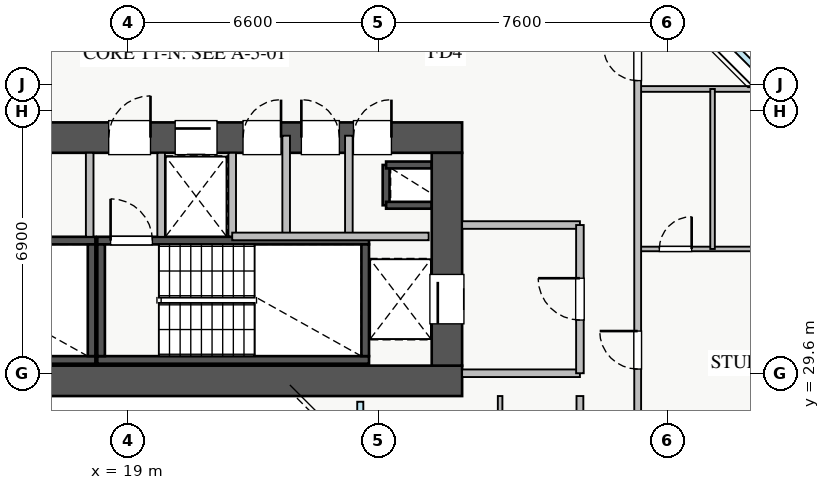
"""IFC4 building model, lengths in metres.
Left out: names, types, materials, properties, quantities, classifications, styles, units other than length and angle.
Written with IfcOpenShell. Run it as: python <this file> out.ifc"""

import sys

from ifc_helpers import new_model, si_unit, direction, frame, frame_2d, origin, place, context, subcontext, project, spatial, rectangle, extrude, source, transform, mapped, element, fill, save


model = new_model("IFC4")
c1 = context("Model", 3, precision=1e-05, world=origin(), true_north=direction((0.0, 1.0)))
c2 = subcontext(c1, "Body", "Model", "MODEL_VIEW")
j1 = project(units=[si_unit("LENGTHUNIT", "METRE"), si_unit("PLANEANGLEUNIT", "RADIAN")], contexts=[c1])
p1 = place(None, origin())
s1 = spatial("IfcSite", under=j1, at=p1, CompositionType="ELEMENT")
p2 = place(p1, origin())
s2 = spatial("IfcBuilding", under=s1, at=p2, CompositionType="ELEMENT")
p3 = place(p2, frame((0.0, 0.0, 79.5)))
s3 = spatial("IfcBuildingStorey", under=s2, at=p3, CompositionType="ELEMENT", Elevation=79.5)
p4 = place(p3, frame((25.8, 34.02, 0.0), z_axis=(0.0, 0.0, 1.0), x_axis=(0.0, 1.0, 0.0)))
e1 = element("IfcWall", 1, at=p4, inside=s3, PredefinedType="SHEAR", context=c2, shape_type="SweptSolid", body=[
    extrude(rectangle(XDim=1.06, YDim=0.18, at=frame_2d((0.53, 0.0))), origin(), (0.0, 0.0, 1.0), 3.07),
])
for number, where, z_axis, x_axis in (
    (2, (25.8, 35.08, 0.0), (0.0, 0.0, 1.0), (1.0, 0.0, 0.0)),
    (3, (25.8, 34.02, 0.0), (0.0, 0.0, 1.0), (1.0, 0.0, 0.0)),
):
    element("IfcWall", number, at=place(p3, frame(where, z_axis=z_axis, x_axis=x_axis)), inside=s3, PredefinedType="SHEAR", context=c2, shape_type="SweptSolid", body=[
        extrude(rectangle(XDim=1.2, YDim=0.18, at=frame_2d((0.6, 0.0))), origin(), (0.0, 0.0, 1.0), 3.07),
    ])
p5 = place(p3, frame((19.88, 33.2, 0.0), z_axis=(0.0, 0.0, 1.0), x_axis=(1.0, 0.0, 0.0)))
e4 = element("IfcWall", 4, at=p5, inside=s3, PredefinedType="SHEAR", context=c2, shape_type="SweptSolid", body=[
    extrude(rectangle(XDim=1.87, YDim=0.18, at=frame_2d((0.935, 0.0))), origin(), (0.0, 0.0, 1.0), 3.07),
])
p6 = place(p3, frame((11.0, 29.95, 0.0), z_axis=(0.0, 0.0, 1.0), x_axis=(1.0, 0.0, 0.0)))
e5 = element("IfcWall", 5, at=p6, inside=s3, PredefinedType="SHEAR", context=c2, shape_type="SweptSolid", body=[
    extrude(rectangle(XDim=7.15, YDim=0.2, at=frame_2d((3.575, 0.0))), origin(), (0.0, 0.0, 1.0), 3.25),
])
p7 = place(p3, frame((11.0, 33.09, 0.0), z_axis=(0.0, 0.0, 1.0), x_axis=(1.0, 0.0, 0.0)))
e6 = element("IfcWall", 6, at=p7, inside=s3, PredefinedType="SHEAR", context=c2, shape_type="SweptSolid", body=[
    extrude(rectangle(XDim=7.15, YDim=0.2, at=frame_2d((3.575, 0.0))), origin(), (0.0, 0.0, 1.0), 3.25),
])
p8 = place(p7, frame((0.35, 0.0, 0.0)))
e7 = element("IfcOpeningElement", 7, at=p8, cuts=e6, PredefinedType="OPENING", context=c2, shape_type="SweptSolid", body=[
    extrude(rectangle(XDim=1.1, YDim=2.05, at=frame_2d((0.55, 1.025))), frame((0.0, 0.11, 0.0), z_axis=(0.0, -1.0, 0.0), x_axis=(1.0, 0.0, 0.0)), (0.0, 0.0, 1.0), 0.22),
])
p9 = place(p3, frame((18.05, 30.05, 0.0), z_axis=(0.0, 0.0, 1.0), x_axis=(0.0, 1.0, 0.0)))
e8 = element("IfcWall", 8, at=p9, inside=s3, PredefinedType="SHEAR", context=c2, shape_type="SweptSolid", body=[
    extrude(rectangle(XDim=2.94, YDim=0.2, at=frame_2d((1.47, 0.0))), origin(), (0.0, 0.0, 1.0), 3.25),
])
p10 = place(p3, frame((18.2, 29.95, 0.0), z_axis=(0.0, 0.0, 1.0), x_axis=(1.0, 0.0, 0.0)))
e9 = element("IfcWall", 9, at=p10, inside=s3, PredefinedType="SHEAR", context=c2, shape_type="SweptSolid", body=[
    extrude(rectangle(XDim=7.15, YDim=0.2, at=frame_2d((3.575, 0.0))), origin(), (0.0, 0.0, 1.0), 3.25),
])
p11 = place(p3, frame((18.2, 33.09, 0.0), z_axis=(0.0, 0.0, 1.0), x_axis=(1.0, 0.0, 0.0)))
e10 = element("IfcWall", 10, at=p11, inside=s3, PredefinedType="SHEAR", context=c2, shape_type="SweptSolid", body=[
    extrude(rectangle(XDim=7.15, YDim=0.2, at=frame_2d((3.575, 0.0))), origin(), (0.0, 0.0, 1.0), 3.25),
])
p12 = place(p11, frame((0.35, 0.0, 0.0)))
e11 = element("IfcOpeningElement", 11, at=p12, cuts=e10, PredefinedType="OPENING", context=c2, shape_type="SweptSolid", body=[
    extrude(rectangle(XDim=1.1, YDim=2.05, at=frame_2d((0.55, 1.025))), frame((0.0, 0.11, 0.0), z_axis=(0.0, -1.0, 0.0), x_axis=(1.0, 0.0, 0.0)), (0.0, 0.0, 1.0), 0.22),
])
for number, where, z_axis, x_axis in (
    (12, (18.3, 30.05, 0.0), (0.0, 0.0, 1.0), (0.0, 1.0, 0.0)),
    (13, (25.25, 30.05, 0.0), (0.0, 0.0, 1.0), (0.0, 1.0, 0.0)),
):
    element("IfcWall", number, at=place(p3, frame(where, z_axis=z_axis, x_axis=x_axis)), inside=s3, PredefinedType="SHEAR", context=c2, shape_type="SweptSolid", body=[
        extrude(rectangle(XDim=2.94, YDim=0.2, at=frame_2d((1.47, 0.0))), origin(), (0.0, 0.0, 1.0), 3.25),
    ])
p13 = place(p3, frame((10.2, 29.4, 0.0), z_axis=(0.0, 0.0, 1.0), x_axis=(1.0, 0.0, 0.0)))
e14 = element("IfcWall", 14, at=p13, inside=s3, PredefinedType="SHEAR", context=c2, shape_type="SweptSolid", body=[
    extrude(rectangle(XDim=17.6, YDim=0.8, at=frame_2d((8.8, 0.0))), origin(), (0.0, 0.0, 1.0), 3.25),
])
p14 = place(p3, frame((10.2, 35.8, 0.0), z_axis=(0.0, 0.0, 1.0), x_axis=(1.0, 0.0, 0.0)))
e15 = element("IfcWall", 15, at=p14, inside=s3, PredefinedType="SHEAR", context=c2, shape_type="SweptSolid", body=[
    extrude(rectangle(XDim=17.6, YDim=0.8, at=frame_2d((8.8, 0.0))), origin(), (0.0, 0.0, 1.0), 3.25),
])
p15 = place(p14, frame((1.15, 0.0, 0.0)))
e16 = element("IfcOpeningElement", 16, at=p15, cuts=e15, PredefinedType="OPENING", context=c2, shape_type="SweptSolid", body=[
    extrude(rectangle(XDim=1.1, YDim=2.05, at=frame_2d((0.55, 1.025))), frame((0.0, 0.41, 0.0), z_axis=(0.0, -1.0, 0.0), x_axis=(1.0, 0.0, 0.0)), (0.0, 0.0, 1.0), 0.82),
])
p16 = place(p14, frame((8.3, 0.0, 0.0)))
e17 = element("IfcOpeningElement", 17, at=p16, cuts=e15, PredefinedType="OPENING", context=c2, shape_type="SweptSolid", body=[
    extrude(rectangle(XDim=1.1, YDim=2.05, at=frame_2d((0.55, 1.025))), frame((0.0, 0.41, 0.0), z_axis=(0.0, -1.0, 0.0), x_axis=(1.0, 0.0, 0.0)), (0.0, 0.0, 1.0), 0.82),
])
p17 = place(p14, frame((10.05, 0.0, 0.0)))
e18 = element("IfcOpeningElement", 18, at=p17, cuts=e15, PredefinedType="OPENING", context=c2, shape_type="SweptSolid", body=[
    extrude(rectangle(XDim=1.1, YDim=2.05, at=frame_2d((0.55, 1.025))), frame((0.0, 0.41, 0.0), z_axis=(0.0, -1.0, 0.0), x_axis=(1.0, 0.0, 0.0)), (0.0, 0.0, 1.0), 0.82),
])
p18 = place(p14, frame((14.74, 0.0, 0.0)))
e19 = element("IfcOpeningElement", 19, at=p18, cuts=e15, PredefinedType="OPENING", context=c2, shape_type="SweptSolid", body=[
    extrude(rectangle(XDim=1.0, YDim=2.05, at=frame_2d((0.5, 1.025))), frame((0.0, 0.41, 0.0), z_axis=(0.0, -1.0, 0.0), x_axis=(1.0, 0.0, 0.0)), (0.0, 0.0, 1.0), 0.82),
])
p19 = place(p14, frame((11.835, 0.0, 0.0)))
e20 = element("IfcOpeningElement", 20, at=p19, cuts=e15, PredefinedType="OPENING", context=c2, shape_type="SweptSolid", body=[
    extrude(rectangle(XDim=1.0, YDim=2.05, at=frame_2d((0.5, 1.025))), frame((0.0, 0.41, 0.0), z_axis=(0.0, -1.0, 0.0), x_axis=(1.0, 0.0, 0.0)), (0.0, 0.0, 1.0), 0.82),
])
p20 = place(p14, frame((13.37, 0.0, 0.0)))
e21 = element("IfcOpeningElement", 21, at=p20, cuts=e15, PredefinedType="OPENING", context=c2, shape_type="SweptSolid", body=[
    extrude(rectangle(XDim=1.0, YDim=2.05, at=frame_2d((0.5, 1.025))), frame((0.0, 0.41, 0.0), z_axis=(0.0, -1.0, 0.0), x_axis=(1.0, 0.0, 0.0)), (0.0, 0.0, 1.0), 0.82),
])
p21 = place(p3, frame((27.4, 29.8, 0.0), z_axis=(0.0, 0.0, 1.0), x_axis=(0.0, 1.0, 0.0)))
e22 = element("IfcWall", 22, at=p21, inside=s3, PredefinedType="SHEAR", context=c2, shape_type="SweptSolid", body=[
    extrude(rectangle(XDim=5.6, YDim=0.8, at=frame_2d((2.8, 0.0))), origin(), (0.0, 0.0, 1.0), 3.25),
])
p22 = place(p21, frame((1.1, 0.0, 0.0)))
e23 = element("IfcOpeningElement", 23, at=p22, cuts=e22, PredefinedType="OPENING", context=c2, shape_type="SweptSolid", body=[
    extrude(rectangle(XDim=1.3, YDim=2.05, at=frame_2d((0.65, 1.025))), frame((0.0, 0.41, 0.0), z_axis=(0.0, -1.0, 0.0), x_axis=(1.0, 0.0, 0.0)), (0.0, 0.0, 1.0), 0.82),
])
for number, where, z_axis, x_axis in (
    (24, (27.8, 29.6, 0.0), (0.0, 0.0, 1.0), (1.0, 0.0, 0.0)),
    (25, (27.8, 33.5, 0.0), (0.0, 0.0, 1.0), (1.0, 0.0, 0.0)),
):
    element("IfcWall", number, at=place(p3, frame(where, z_axis=z_axis, x_axis=x_axis)), inside=s3, PredefinedType="PARTITIONING", context=c2, shape_type="SweptSolid", body=[
        extrude(rectangle(XDim=3.1, YDim=0.2, at=frame_2d((1.55, 0.0))), origin(), (0.0, 0.0, 1.0), 3.07),
    ])
p23 = place(p3, frame((30.9, 29.6, 0.0), z_axis=(0.0, 0.0, 1.0), x_axis=(0.0, 1.0, 0.0)))
e26 = element("IfcWall", 26, at=p23, inside=s3, PredefinedType="PARTITIONING", context=c2, shape_type="SweptSolid", body=[
    extrude(rectangle(XDim=3.9, YDim=0.2, at=frame_2d((1.95, 0.0))), origin(), (0.0, 0.0, 1.0), 3.07),
])
p24 = place(p23, frame((1.4, 0.0, 0.0)))
e27 = element("IfcOpeningElement", 27, at=p24, cuts=e26, PredefinedType="OPENING", context=c2, shape_type="SweptSolid", body=[
    extrude(rectangle(XDim=1.1, YDim=2.05, at=frame_2d((0.55, 1.025))), frame((0.0, 0.11, 0.0), z_axis=(0.0, -1.0, 0.0), x_axis=(1.0, 0.0, 0.0)), (0.0, 0.0, 1.0), 0.22),
])
for number, where, z_axis, x_axis in (
    (28, (18.0, 33.19, 0.0), (0.0, 0.0, 1.0), (0.0, 1.0, 0.0)),
    (29, (19.88, 33.19, 0.0), (0.0, 0.0, 1.0), (0.0, 1.0, 0.0)),
):
    element("IfcWall", number, at=place(p3, frame(where, z_axis=z_axis, x_axis=x_axis)), inside=s3, PredefinedType="PARTITIONING", context=c2, shape_type="SweptSolid", body=[
        extrude(rectangle(XDim=2.21, YDim=0.2, at=frame_2d((1.105, 0.0))), origin(), (0.0, 0.0, 1.0), 3.07),
    ])
p25 = place(p3, frame((24.82, 33.2, 0.0), z_axis=(0.0, 0.0, 1.0), x_axis=(0.0, 1.0, 0.0)))
e30 = element("IfcWall", 30, at=p25, inside=s3, PredefinedType="PARTITIONING", context=c2, shape_type="SweptSolid", body=[
    extrude(rectangle(XDim=2.65, YDim=0.2, at=frame_2d((1.325, 0.0))), origin(), (0.0, 0.0, 1.0), 3.07),
])
p26 = place(p3, frame((21.75, 33.2, 0.0), z_axis=(0.0, 0.0, 1.0), x_axis=(0.0, 1.0, 0.0)))
e31 = element("IfcWall", 31, at=p26, inside=s3, PredefinedType="PARTITIONING", context=c2, shape_type="SweptSolid", body=[
    extrude(rectangle(XDim=2.2, YDim=0.2, at=frame_2d((1.1, 0.0))), origin(), (0.0, 0.0, 1.0), 3.07),
])
p27 = place(p3, frame((23.17, 33.2, 0.0), z_axis=(0.0, 0.0, 1.0), x_axis=(0.0, 1.0, 0.0)))
e32 = element("IfcWall", 32, at=p27, inside=s3, PredefinedType="PARTITIONING", context=c2, shape_type="SweptSolid", body=[
    extrude(rectangle(XDim=2.65, YDim=0.2, at=frame_2d((1.325, 0.0))), origin(), (0.0, 0.0, 1.0), 3.07),
])
p28 = place(p3, frame((21.75, 33.2, 0.0), z_axis=(0.0, 0.0, 1.0), x_axis=(1.0, 0.0, 0.0)))
e33 = element("IfcWall", 33, at=p28, inside=s3, PredefinedType="PARTITIONING", context=c2, shape_type="SweptSolid", body=[
    extrude(rectangle(XDim=5.17, YDim=0.2, at=frame_2d((2.585, 0.0))), origin(), (0.0, 0.0, 1.0), 3.07),
])
p29 = place(p3, frame((32.42, 37.08, 0.0), z_axis=(0.0, 0.0, 1.0), x_axis=(1.0, 0.0, 0.0)))
e34 = element("IfcWall", 34, at=p29, inside=s3, PredefinedType="PARTITIONING", context=c2, shape_type="SweptSolid", body=[
    extrude(rectangle(XDim=5.33, YDim=0.15, at=frame_2d((2.665, 0.0))), origin(), (0.0, 0.0, 1.0), 3.07),
])
p30 = place(p3, frame((32.42, 32.87, 0.0), z_axis=(0.0, 0.0, 1.0), x_axis=(1.0, 0.0, 0.0)))
e35 = element("IfcWall", 35, at=p30, inside=s3, PredefinedType="PLUMBINGWALL", context=c2, shape_type="SweptSolid", body=[
    extrude(rectangle(XDim=5.33, YDim=0.12, at=frame_2d((2.665, 0.0))), origin(), (0.0, 0.0, 1.0), 3.07),
])
p31 = place(p30, frame((0.57, 0.0, 0.0)))
e36 = element("IfcOpeningElement", 36, at=p31, cuts=e35, PredefinedType="OPENING", context=c2, shape_type="SweptSolid", body=[
    extrude(rectangle(XDim=0.85, YDim=2.05, at=frame_2d((0.425, 1.025))), frame((0.0, 0.07, 0.0), z_axis=(0.0, -1.0, 0.0), x_axis=(1.0, 0.0, 0.0)), (0.0, 0.0, 1.0), 0.14),
])
p32 = place(p30, frame((3.19, 0.0, 0.0)))
e37 = element("IfcOpeningElement", 37, at=p32, cuts=e35, PredefinedType="OPENING", context=c2, shape_type="SweptSolid", body=[
    extrude(rectangle(XDim=0.9, YDim=2.05, at=frame_2d((0.45, 1.025))), frame((0.0, 0.07, 0.0), z_axis=(0.0, -1.0, 0.0), x_axis=(1.0, 0.0, 0.0)), (0.0, 0.0, 1.0), 0.14),
])
p33 = place(p3, frame((34.39, 32.87, 0.0), z_axis=(0.0, 0.0, 1.0), x_axis=(0.0, 1.0, 0.0)))
e38 = element("IfcWall", 38, at=p33, inside=s3, PredefinedType="PLUMBINGWALL", context=c2, shape_type="SweptSolid", body=[
    extrude(rectangle(XDim=4.21, YDim=0.12, at=frame_2d((2.105, 0.0))), origin(), (0.0, 0.0, 1.0), 3.07),
])
p34 = place(p3, frame((32.42, 7.21, 0.0), z_axis=(0.0, 0.0, 1.0), x_axis=(0.0, 1.0, 0.0)))
e39 = element("IfcWall", 39, at=p34, inside=s3, PredefinedType="PARTITIONING", context=c2, shape_type="SweptSolid", body=[
    extrude(rectangle(XDim=31.23, YDim=0.18, at=frame_2d((15.615, 0.0))), origin(), (0.0, 0.0, 1.0), 2.821),
])
p35 = place(p34, frame((30.09, 0.0, 0.0)))
e40 = element("IfcOpeningElement", 40, at=p35, cuts=e39, PredefinedType="OPENING", context=c2, shape_type="SweptSolid", body=[
    extrude(rectangle(XDim=0.9, YDim=2.05, at=frame_2d((0.45, 1.025))), frame((0.0, 0.1, 0.0), z_axis=(0.0, -1.0, 0.0), x_axis=(1.0, 0.0, 0.0)), (0.0, 0.0, 1.0), 0.2),
])
p36 = place(p34, frame((0.415, 0.0, 0.0)))
e41 = element("IfcOpeningElement", 41, at=p36, cuts=e39, PredefinedType="OPENING", context=c2, shape_type="SweptSolid", body=[
    extrude(rectangle(XDim=0.9, YDim=2.05, at=frame_2d((0.45, 1.025))), frame((0.0, 0.1, 0.0), z_axis=(0.0, -1.0, 0.0), x_axis=(1.0, 0.0, 0.0)), (0.0, 0.0, 1.0), 0.2),
])
p37 = place(p34, frame((5.675, 0.0, 0.0)))
e42 = element("IfcOpeningElement", 42, at=p37, cuts=e39, PredefinedType="OPENING", context=c2, shape_type="SweptSolid", body=[
    extrude(rectangle(XDim=1.0, YDim=2.05, at=frame_2d((0.5, 1.025))), frame((0.0, 0.1, 0.0), z_axis=(0.0, -1.0, 0.0), x_axis=(1.0, 0.0, 0.0)), (0.0, 0.0, 1.0), 0.2),
])
p38 = place(p34, frame((12.575, 0.0, 0.0)))
e43 = element("IfcOpeningElement", 43, at=p38, cuts=e39, PredefinedType="OPENING", context=c2, shape_type="SweptSolid", body=[
    extrude(rectangle(XDim=1.0, YDim=2.05, at=frame_2d((0.5, 1.025))), frame((0.0, 0.1, 0.0), z_axis=(0.0, -1.0, 0.0), x_axis=(1.0, 0.0, 0.0)), (0.0, 0.0, 1.0), 0.2),
])
p39 = place(p34, frame((22.5, 0.0, 0.0)))
e44 = element("IfcOpeningElement", 44, at=p39, cuts=e39, PredefinedType="OPENING", context=c2, shape_type="SweptSolid", body=[
    extrude(rectangle(XDim=1.0, YDim=2.05, at=frame_2d((0.5, 1.025))), frame((0.0, 0.1, 0.0), z_axis=(0.0, -1.0, 0.0), x_axis=(1.0, 0.0, 0.0)), (0.0, 0.0, 1.0), 0.2),
])
p40 = place(p3, frame((28.8, 26.39, 0.0), z_axis=(0.0, 0.0, 1.0), x_axis=(0.0, 1.0, 0.0)))
e45 = element("IfcWall", 45, at=p40, inside=s3, PredefinedType="PLUMBINGWALL", context=c2, shape_type="SweptSolid", body=[
    extrude(rectangle(XDim=2.61, YDim=0.12, at=frame_2d((1.305, 0.0))), origin(), (0.0, 0.0, 1.0), 3.07),
])
p41 = place(p3, frame((30.9, 17.0, 0.0), z_axis=(0.0, 0.0, 1.0), x_axis=(0.0, 1.0, 0.0)))
e46 = element("IfcWall", 46, at=p41, inside=s3, PredefinedType="PARTITIONING", context=c2, shape_type="SweptSolid", body=[
    extrude(rectangle(XDim=12.0, YDim=0.18, at=frame_2d((6.0, 0.0))), origin(), (0.0, 0.0, 1.0), 3.07),
])
p42 = place(p41, frame((1.02, 0.0, 0.0)))
e47 = element("IfcOpeningElement", 47, at=p42, cuts=e46, PredefinedType="OPENING", context=c2, shape_type="SweptSolid", body=[
    extrude(rectangle(XDim=1.0, YDim=2.05, at=frame_2d((0.5, 1.025))), frame((0.0, 0.1, 0.0), z_axis=(0.0, -1.0, 0.0), x_axis=(1.0, 0.0, 0.0)), (0.0, 0.0, 1.0), 0.2),
])
p43 = place(p41, frame((7.17, 0.0, 0.0)))
e48 = element("IfcOpeningElement", 48, at=p43, cuts=e46, PredefinedType="OPENING", context=c2, shape_type="SweptSolid", body=[
    extrude(rectangle(XDim=1.0, YDim=2.05, at=frame_2d((0.5, 1.025))), frame((0.0, 0.1, 0.0), z_axis=(0.0, -1.0, 0.0), x_axis=(1.0, 0.0, 0.0)), (0.0, 0.0, 1.0), 0.2),
])
m1 = source(origin(), c2, "Body", "SweptSolid", [
    extrude(rectangle(XDim=1.3, YDim=2.05, at=frame_2d((0.65, 1.025))), frame((0.0, 0.025, 0.0), z_axis=(0.0, -1.0, 0.0), x_axis=(1.0, 0.0, 0.0)), (0.0, 0.0, 1.0), 0.05),
])
p44 = place(p22, origin())
e49 = element("IfcDoor", 49, at=p44, inside=s3, OperationType="SLIDING_TO_LEFT", PredefinedType="DOOR", context=c2, shape_type="MappedRepresentation", body=[
    mapped(m1, transform((0.0, 0.0, 0.0), x_axis=(1.0, 0.0, 0.0), y_axis=(0.0, 1.0, 0.0), z_axis=(0.0, 0.0, 1.0), scale=1.0)),
])
fill(e23, e49)
m2 = source(origin(), c2, "Body", "SweptSolid", [
    extrude(rectangle(XDim=1.1, YDim=2.05, at=frame_2d((0.55, 1.025))), frame((0.0, 0.025, 0.0), z_axis=(0.0, -1.0, 0.0), x_axis=(1.0, 0.0, 0.0)), (0.0, 0.0, 1.0), 0.05),
])
p45 = place(p16, origin())
e50 = element("IfcDoor", 50, at=p45, inside=s3, OperationType="SINGLE_SWING_RIGHT", PredefinedType="DOOR", context=c2, shape_type="MappedRepresentation", body=[
    mapped(m2, transform((0.0, 0.0, 0.0), x_axis=(1.0, 0.0, 0.0), y_axis=(0.0, 1.0, 0.0), z_axis=(0.0, 0.0, 1.0), scale=1.0)),
])
fill(e17, e50)
p46 = place(p12, origin())
e51 = element("IfcDoor", 51, at=p46, inside=s3, OperationType="SINGLE_SWING_LEFT", PredefinedType="DOOR", context=c2, shape_type="MappedRepresentation", body=[
    mapped(m2, transform((0.0, 0.0, 0.0), x_axis=(1.0, 0.0, 0.0), y_axis=(0.0, 1.0, 0.0), z_axis=(0.0, 0.0, 1.0), scale=1.0)),
])
fill(e11, e51)
p47 = place(p17, origin())
e52 = element("IfcDoor", 52, at=p47, inside=s3, OperationType="SLIDING_TO_LEFT", PredefinedType="DOOR", context=c2, shape_type="MappedRepresentation", body=[
    mapped(m2, transform((0.0, 0.0, 0.0), x_axis=(1.0, 0.0, 0.0), y_axis=(0.0, 1.0, 0.0), z_axis=(0.0, 0.0, 1.0), scale=1.0)),
])
fill(e18, e52)
m3 = source(origin(), c2, "Body", "SweptSolid", [
    extrude(rectangle(XDim=1.0, YDim=2.05, at=frame_2d((0.5, 1.025))), frame((0.0, 0.025, 0.0), z_axis=(0.0, -1.0, 0.0), x_axis=(1.0, 0.0, 0.0)), (0.0, 0.0, 1.0), 0.05),
])
p48 = place(p18, origin())
e53 = element("IfcDoor", 53, at=p48, inside=s3, OperationType="SINGLE_SWING_RIGHT", PredefinedType="DOOR", context=c2, shape_type="MappedRepresentation", body=[
    mapped(m3, transform((0.0, 0.0, 0.0), x_axis=(1.0, 0.0, 0.0), y_axis=(0.0, 1.0, 0.0), z_axis=(0.0, 0.0, 1.0), scale=1.0)),
])
fill(e19, e53)
p49 = place(p19, origin())
e54 = element("IfcDoor", 54, at=p49, inside=s3, OperationType="SINGLE_SWING_RIGHT", PredefinedType="DOOR", context=c2, shape_type="MappedRepresentation", body=[
    mapped(m3, transform((0.0, 0.0, 0.0), x_axis=(1.0, 0.0, 0.0), y_axis=(0.0, 1.0, 0.0), z_axis=(0.0, 0.0, 1.0), scale=1.0)),
])
fill(e20, e54)
p50 = place(p20, origin())
e55 = element("IfcDoor", 55, at=p50, inside=s3, OperationType="SINGLE_SWING_LEFT", PredefinedType="DOOR", context=c2, shape_type="MappedRepresentation", body=[
    mapped(m3, transform((0.0, 0.0, 0.0), x_axis=(1.0, 0.0, 0.0), y_axis=(0.0, 1.0, 0.0), z_axis=(0.0, 0.0, 1.0), scale=1.0)),
])
fill(e21, e55)
p51 = place(p24, origin())
e56 = element("IfcDoor", 56, at=p51, inside=s3, OperationType="SINGLE_SWING_RIGHT", PredefinedType="DOOR", context=c2, shape_type="MappedRepresentation", body=[
    mapped(m2, transform((0.0, 0.0, 0.0), x_axis=(1.0, 0.0, 0.0), y_axis=(0.0, 1.0, 0.0), z_axis=(0.0, 0.0, 1.0), scale=1.0)),
])
fill(e27, e56)
m4 = source(origin(), c2, "Body", "SweptSolid", [
    extrude(rectangle(XDim=0.85, YDim=2.05, at=frame_2d((0.425, 1.025))), frame((0.0, 0.025, 0.0), z_axis=(0.0, -1.0, 0.0), x_axis=(1.0, 0.0, 0.0)), (0.0, 0.0, 1.0), 0.05),
])
p52 = place(p31, origin())
e57 = element("IfcDoor", 57, at=p52, inside=s3, OperationType="SINGLE_SWING_RIGHT", PredefinedType="DOOR", context=c2, shape_type="MappedRepresentation", body=[
    mapped(m4, transform((0.0, 0.0, 0.0), x_axis=(1.0, 0.0, 0.0), y_axis=(0.0, 1.0, 0.0), z_axis=(0.0, 0.0, 1.0), scale=1.0)),
])
fill(e36, e57)
m5 = source(origin(), c2, "Body", "SweptSolid", [
    extrude(rectangle(XDim=0.9, YDim=2.05, at=frame_2d((0.45, 1.025))), frame((0.0, 0.025, 0.0), z_axis=(0.0, -1.0, 0.0), x_axis=(1.0, 0.0, 0.0)), (0.0, 0.0, 1.0), 0.05),
])
p53 = place(p35, origin())
e58 = element("IfcDoor", 58, at=p53, inside=s3, OperationType="SINGLE_SWING_RIGHT", PredefinedType="DOOR", context=c2, shape_type="MappedRepresentation", body=[
    mapped(m5, transform((0.0, 0.0, 0.0), x_axis=(1.0, 0.0, 0.0), y_axis=(0.0, 1.0, 0.0), z_axis=(0.0, 0.0, 1.0), scale=1.0)),
])
fill(e40, e58)
p54 = place(p39, origin())
e59 = element("IfcDoor", 59, at=p54, inside=s3, OperationType="SINGLE_SWING_RIGHT", PredefinedType="DOOR", context=c2, shape_type="MappedRepresentation", body=[
    mapped(m3, transform((0.0, 0.0, 0.0), x_axis=(1.0, 0.0, 0.0), y_axis=(0.0, 1.0, 0.0), z_axis=(0.0, 0.0, 1.0), scale=1.0)),
])
fill(e44, e59)
save(model, sys.argv[1])
